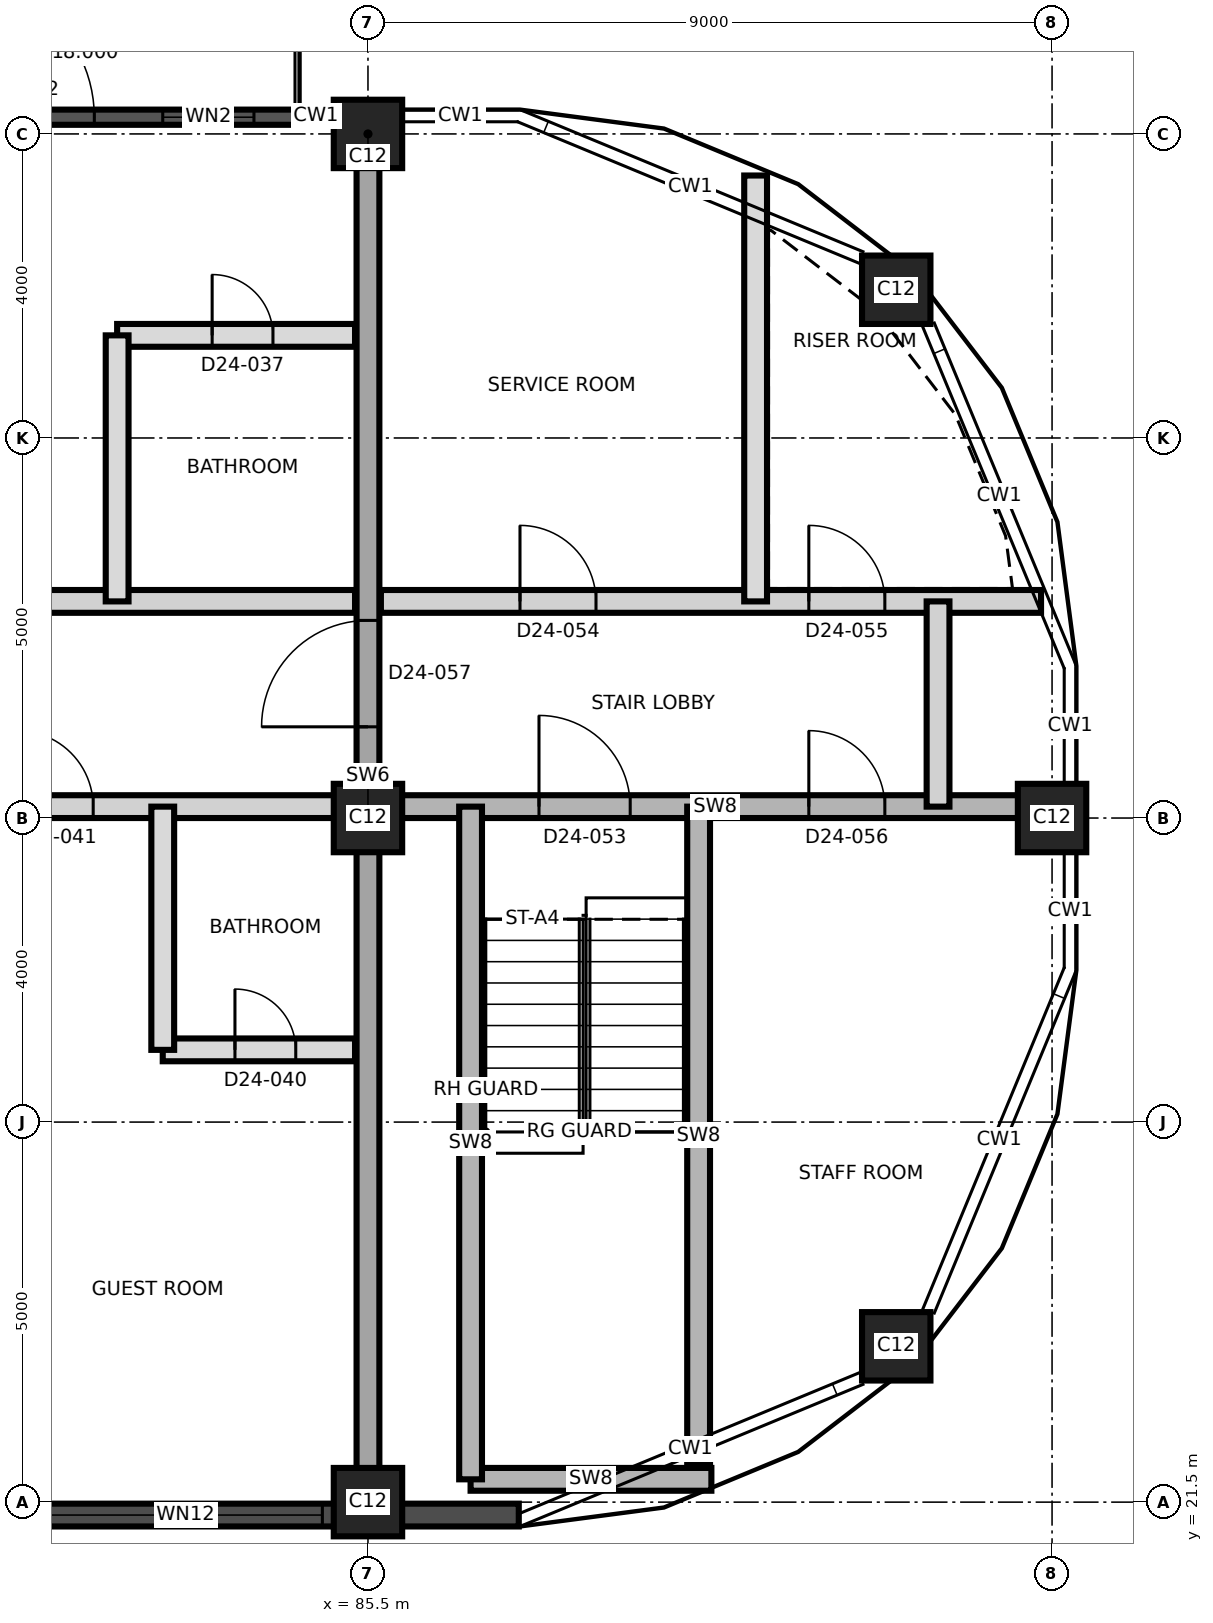
"""IFC4 building model, lengths in metres.
Left out: names, types, materials, properties, quantities, classifications, styles, units other than length and angle.
Written with IfcOpenShell. Run it as: python <this file> out.ifc"""

import sys

from ifc_helpers import new_model, si_unit, direction, frame, frame_2d, origin, origin_2d, place, context, subcontext, project, spatial, rectangle, extrude, element, fill, save


model = new_model("IFC4")
c1 = context("Model", 3, precision=1e-05, world=origin(), true_north=direction((0.0, 1.0)))
c2 = subcontext(c1, "Body", "Model", "MODEL_VIEW")
j1 = project(units=[si_unit("LENGTHUNIT", "METRE"), si_unit("PLANEANGLEUNIT", "RADIAN")], contexts=[c1])
p1 = place(None, origin())
s1 = spatial("IfcSite", under=j1, at=p1, CompositionType="ELEMENT")
p2 = place(p1, origin())
s2 = spatial("IfcBuilding", under=s1, at=p2, CompositionType="ELEMENT")
p3 = place(p2, frame((0.0, 0.0, 218.0)))
s3 = spatial("IfcBuildingStorey", under=s2, at=p3, CompositionType="ELEMENT", Elevation=218.0)
for number, where, z_axis, x_axis in (
    (1, (85.5, 21.5, 0.0), (0.0, 0.0, 1.0), (1.0, 0.0, 0.0)),
    (2, (92.45, 23.55, 0.0), (0.0, 0.0, 1.0), (1.0, 0.0, 0.0)),
    (3, (85.5, 30.5, 0.0), (0.0, 0.0, 1.0), (1.0, 0.0, 0.0)),
    (4, (94.5, 30.5, 0.0), (0.0, 0.0, 1.0), (1.0, 0.0, 0.0)),
    (5, (92.45, 37.45, 0.0), (0.0, 0.0, 1.0), (1.0, 0.0, 0.0)),
    (6, (85.5, 39.5, 0.0), (0.0, 0.0, 1.0), (1.0, 0.0, 0.0)),
):
    element("IfcColumn", number, at=place(p3, frame(where, z_axis=z_axis, x_axis=x_axis)), inside=s3, PredefinedType="COLUMN", context=c2, shape_type="SweptSolid", body=[
        extrude(rectangle(XDim=0.9, YDim=0.9, at=origin_2d()), origin(), (0.0, 0.0, 1.0), 3.7),
    ])
p4 = place(p3, frame((85.5, 21.53, 0.0), z_axis=(0.0, 0.0, 1.0), x_axis=(0.0, 1.0, 0.0)))
e7 = element("IfcWall", 7, at=p4, inside=s3, PredefinedType="SHEAR", context=c2, shape_type="SweptSolid", body=[
    extrude(rectangle(XDim=17.94, YDim=0.3, at=frame_2d((8.97, 0.0))), origin(), (0.0, 0.0, 1.0), 3.7),
])
p5 = place(p4, frame((10.17, 0.0, 0.0)))
e8 = element("IfcOpeningElement", 8, at=p5, cuts=e7, PredefinedType="OPENING", context=c2, shape_type="SweptSolid", body=[
    extrude(rectangle(XDim=1.4, YDim=2.1, at=frame_2d((0.7, 1.05))), frame((0.0, 0.16, 0.0), z_axis=(0.0, -1.0, 0.0), x_axis=(1.0, 0.0, 0.0)), (0.0, 0.0, 1.0), 0.32),
])
p6 = place(p3, frame((59.25, 21.33, 0.0), z_axis=(0.0, 0.0, 1.0), x_axis=(1.0, 0.0, 0.0)))
e9 = element("IfcWall", 9, at=p6, inside=s3, PredefinedType="SOLIDWALL", context=c2, shape_type="SweptSolid", body=[
    extrude(rectangle(XDim=28.234, YDim=0.3, at=frame_2d((14.117, 0.0))), origin(), (0.0, 0.0, 1.0), 3.4),
])
p7 = place(p6, frame((0.975, 0.0, 0.3)))
e10 = element("IfcOpeningElement", 10, at=p7, cuts=e9, PredefinedType="OPENING", context=c2, shape_type="SweptSolid", body=[
    extrude(rectangle(XDim=1.8, YDim=2.4, at=frame_2d((0.9, 1.2))), frame((0.0, 0.16, 0.0), z_axis=(0.0, -1.0, 0.0), x_axis=(1.0, 0.0, 0.0)), (0.0, 0.0, 1.0), 0.32),
])
p8 = place(p6, frame((4.05, 0.0, 0.9)))
e11 = element("IfcOpeningElement", 11, at=p8, cuts=e9, PredefinedType="OPENING", context=c2, shape_type="SweptSolid", body=[
    extrude(rectangle(XDim=3.6, YDim=1.5, at=frame_2d((1.8, 0.75))), frame((0.0, 0.16, 0.0), z_axis=(0.0, -1.0, 0.0), x_axis=(1.0, 0.0, 0.0)), (0.0, 0.0, 1.0), 0.32),
])
p9 = place(p6, frame((8.85, 0.0, 0.9)))
e12 = element("IfcOpeningElement", 12, at=p9, cuts=e9, PredefinedType="OPENING", context=c2, shape_type="SweptSolid", body=[
    extrude(rectangle(XDim=3.6, YDim=1.5, at=frame_2d((1.8, 0.75))), frame((0.0, 0.16, 0.0), z_axis=(0.0, -1.0, 0.0), x_axis=(1.0, 0.0, 0.0)), (0.0, 0.0, 1.0), 0.32),
])
p10 = place(p6, frame((13.05, 0.0, 0.9)))
e13 = element("IfcOpeningElement", 13, at=p10, cuts=e9, PredefinedType="OPENING", context=c2, shape_type="SweptSolid", body=[
    extrude(rectangle(XDim=3.6, YDim=1.5, at=frame_2d((1.8, 0.75))), frame((0.0, 0.16, 0.0), z_axis=(0.0, -1.0, 0.0), x_axis=(1.0, 0.0, 0.0)), (0.0, 0.0, 1.0), 0.32),
])
p11 = place(p6, frame((17.85, 0.0, 0.9)))
e14 = element("IfcOpeningElement", 14, at=p11, cuts=e9, PredefinedType="OPENING", context=c2, shape_type="SweptSolid", body=[
    extrude(rectangle(XDim=3.6, YDim=1.5, at=frame_2d((1.8, 0.75))), frame((0.0, 0.16, 0.0), z_axis=(0.0, -1.0, 0.0), x_axis=(1.0, 0.0, 0.0)), (0.0, 0.0, 1.0), 0.32),
])
p12 = place(p6, frame((22.05, 0.0, 0.9)))
e15 = element("IfcOpeningElement", 15, at=p12, cuts=e9, PredefinedType="OPENING", context=c2, shape_type="SweptSolid", body=[
    extrude(rectangle(XDim=3.6, YDim=1.5, at=frame_2d((1.8, 0.75))), frame((0.0, 0.16, 0.0), z_axis=(0.0, -1.0, 0.0), x_axis=(1.0, 0.0, 0.0)), (0.0, 0.0, 1.0), 0.32),
])
p13 = place(p3, frame((76.95, 39.72, 0.0), z_axis=(0.0, 0.0, 1.0), x_axis=(1.0, 0.0, 0.0)))
e16 = element("IfcWall", 16, at=p13, inside=s3, PredefinedType="SOLIDWALL", context=c2, shape_type="SweptSolid", body=[
    extrude(rectangle(XDim=8.1, YDim=0.2, at=frame_2d((4.05, 0.0))), origin(), (0.0, 0.0, 1.0), 3.4),
])
p14 = place(p13, frame((3.15, 0.0, 0.0)))
e17 = element("IfcOpeningElement", 17, at=p14, cuts=e16, PredefinedType="OPENING", context=c2, shape_type="SweptSolid", body=[
    extrude(rectangle(XDim=1.8, YDim=2.4, at=frame_2d((0.9, 1.2))), frame((0.0, 0.11, 0.0), z_axis=(0.0, -1.0, 0.0), x_axis=(1.0, 0.0, 0.0)), (0.0, 0.0, 1.0), 0.22),
])
p15 = place(p13, frame((5.85, 0.0, 0.9)))
e18 = element("IfcOpeningElement", 18, at=p15, cuts=e16, PredefinedType="OPENING", context=c2, shape_type="SweptSolid", body=[
    extrude(rectangle(XDim=1.2, YDim=2.1, at=frame_2d((0.6, 1.05))), frame((0.0, 0.11, 0.0), z_axis=(0.0, -1.0, 0.0), x_axis=(1.0, 0.0, 0.0)), (0.0, 0.0, 1.0), 0.22),
])
p16 = place(p13, frame((1.05, 0.0, 0.9)))
e19 = element("IfcOpeningElement", 19, at=p16, cuts=e16, PredefinedType="OPENING", context=c2, shape_type="SweptSolid", body=[
    extrude(rectangle(XDim=1.2, YDim=2.1, at=frame_2d((0.6, 1.05))), frame((0.0, 0.11, 0.0), z_axis=(0.0, -1.0, 0.0), x_axis=(1.0, 0.0, 0.0)), (0.0, 0.0, 1.0), 0.22),
])
p17 = place(p3, frame((86.85, 21.8, 0.0), z_axis=(0.0, 0.0, 1.0), x_axis=(1.0, 0.0, 0.0)))
e20 = element("IfcWall", 20, at=p17, inside=s3, PredefinedType="SHEAR", context=c2, shape_type="SweptSolid", body=[
    extrude(rectangle(XDim=3.168, YDim=0.3, at=frame_2d((1.584, 0.0))), origin(), (0.0, 0.0, 1.0), 3.4),
])
p18 = place(p3, frame((82.8, 27.45, 0.0), z_axis=(0.0, 0.0, 1.0), x_axis=(1.0, 0.0, 0.0)))
e21 = element("IfcWall", 21, at=p18, inside=s3, PredefinedType="PARTITIONING", context=c2, shape_type="SweptSolid", body=[
    extrude(rectangle(XDim=2.53, YDim=0.3, at=frame_2d((1.265, 0.0))), origin(), (0.0, 0.0, 1.0), 3.4),
])
p19 = place(p18, frame((0.95, 0.0, 0.0)))
e22 = element("IfcOpeningElement", 22, at=p19, cuts=e21, PredefinedType="OPENING", context=c2, shape_type="SweptSolid", body=[
    extrude(rectangle(XDim=0.8, YDim=2.1, at=frame_2d((0.4, 1.05))), frame((0.0, 0.16, 0.0), z_axis=(0.0, -1.0, 0.0), x_axis=(1.0, 0.0, 0.0)), (0.0, 0.0, 1.0), 0.32),
])
p20 = place(p3, frame((58.55, 30.65, 0.0), z_axis=(0.0, 0.0, 1.0), x_axis=(1.0, 0.0, 0.0)))
e23 = element("IfcWall", 23, at=p20, inside=s3, PredefinedType="PARTITIONING", context=c2, shape_type="SweptSolid", body=[
    extrude(rectangle(XDim=26.78, YDim=0.3, at=frame_2d((13.39, 0.0))), origin(), (0.0, 0.0, 1.0), 3.4),
])
p21 = place(p20, frame((2.3, 0.0, 0.0)))
e24 = element("IfcOpeningElement", 24, at=p21, cuts=e23, PredefinedType="OPENING", context=c2, shape_type="SweptSolid", body=[
    extrude(rectangle(XDim=1.0, YDim=2.4, at=frame_2d((0.5, 1.2))), frame((0.0, 0.16, 0.0), z_axis=(0.0, -1.0, 0.0), x_axis=(1.0, 0.0, 0.0)), (0.0, 0.0, 1.0), 0.32),
])
p22 = place(p20, frame((10.1, 0.0, 0.0)))
e25 = element("IfcOpeningElement", 25, at=p22, cuts=e23, PredefinedType="OPENING", context=c2, shape_type="SweptSolid", body=[
    extrude(rectangle(XDim=1.0, YDim=2.1, at=frame_2d((0.5, 1.05))), frame((0.0, 0.16, 0.0), z_axis=(0.0, -1.0, 0.0), x_axis=(1.0, 0.0, 0.0)), (0.0, 0.0, 1.0), 0.32),
])
p23 = place(p20, frame((15.95, 0.0, 0.0)))
e26 = element("IfcOpeningElement", 26, at=p23, cuts=e23, PredefinedType="OPENING", context=c2, shape_type="SweptSolid", body=[
    extrude(rectangle(XDim=1.0, YDim=2.1, at=frame_2d((0.5, 1.05))), frame((0.0, 0.16, 0.0), z_axis=(0.0, -1.0, 0.0), x_axis=(1.0, 0.0, 0.0)), (0.0, 0.0, 1.0), 0.32),
])
p24 = place(p20, frame((19.085, 0.0, 0.0)))
e27 = element("IfcOpeningElement", 27, at=p24, cuts=e23, PredefinedType="OPENING", context=c2, shape_type="SweptSolid", body=[
    extrude(rectangle(XDim=1.2, YDim=2.1, at=frame_2d((0.6, 1.05))), frame((0.0, 0.16, 0.0), z_axis=(0.0, -1.0, 0.0), x_axis=(1.0, 0.0, 0.0)), (0.0, 0.0, 1.0), 0.32),
])
p25 = place(p20, frame((22.335, 0.0, 0.0)))
e28 = element("IfcOpeningElement", 28, at=p25, cuts=e23, PredefinedType="OPENING", context=c2, shape_type="SweptSolid", body=[
    extrude(rectangle(XDim=1.0, YDim=2.1, at=frame_2d((0.5, 1.05))), frame((0.0, 0.16, 0.0), z_axis=(0.0, -1.0, 0.0), x_axis=(1.0, 0.0, 0.0)), (0.0, 0.0, 1.0), 0.32),
])
p26 = place(p3, frame((85.67, 30.65, 0.0), z_axis=(0.0, 0.0, 1.0), x_axis=(1.0, 0.0, 0.0)))
e29 = element("IfcWall", 29, at=p26, inside=s3, PredefinedType="SHEAR", context=c2, shape_type="SweptSolid", body=[
    extrude(rectangle(XDim=8.8, YDim=0.3, at=frame_2d((4.4, 0.0))), origin(), (0.0, 0.0, 1.0), 3.4),
])
p27 = place(p26, frame((2.08, 0.0, 0.0)))
e30 = element("IfcOpeningElement", 30, at=p27, cuts=e29, PredefinedType="OPENING", context=c2, shape_type="SweptSolid", body=[
    extrude(rectangle(XDim=1.2, YDim=2.1, at=frame_2d((0.6, 1.05))), frame((0.0, 0.16, 0.0), z_axis=(0.0, -1.0, 0.0), x_axis=(1.0, 0.0, 0.0)), (0.0, 0.0, 1.0), 0.32),
])
p28 = place(p26, frame((5.63, 0.0, 0.0)))
e31 = element("IfcOpeningElement", 31, at=p28, cuts=e29, PredefinedType="OPENING", context=c2, shape_type="SweptSolid", body=[
    extrude(rectangle(XDim=1.0, YDim=2.1, at=frame_2d((0.5, 1.05))), frame((0.0, 0.16, 0.0), z_axis=(0.0, -1.0, 0.0), x_axis=(1.0, 0.0, 0.0)), (0.0, 0.0, 1.0), 0.32),
])
p29 = place(p3, frame((58.55, 33.35, 0.0), z_axis=(0.0, 0.0, 1.0), x_axis=(1.0, 0.0, 0.0)))
e32 = element("IfcWall", 32, at=p29, inside=s3, PredefinedType="PARTITIONING", context=c2, shape_type="SweptSolid", body=[
    extrude(rectangle(XDim=26.78, YDim=0.3, at=frame_2d((13.39, 0.0))), origin(), (0.0, 0.0, 1.0), 3.4),
])
p30 = place(p29, frame((3.95, 0.0, 0.0)))
e33 = element("IfcOpeningElement", 33, at=p30, cuts=e32, PredefinedType="OPENING", context=c2, shape_type="SweptSolid", body=[
    extrude(rectangle(XDim=1.0, YDim=2.4, at=frame_2d((0.5, 1.2))), frame((0.0, 0.16, 0.0), z_axis=(0.0, -1.0, 0.0), x_axis=(1.0, 0.0, 0.0)), (0.0, 0.0, 1.0), 0.32),
])
p31 = place(p29, frame((12.05, 0.0, 0.0)))
e34 = element("IfcOpeningElement", 34, at=p31, cuts=e32, PredefinedType="OPENING", context=c2, shape_type="SweptSolid", body=[
    extrude(rectangle(XDim=1.0, YDim=2.1, at=frame_2d((0.5, 1.05))), frame((0.0, 0.16, 0.0), z_axis=(0.0, -1.0, 0.0), x_axis=(1.0, 0.0, 0.0)), (0.0, 0.0, 1.0), 0.32),
])
p32 = place(p29, frame((13.85, 0.0, 0.0)))
e35 = element("IfcOpeningElement", 35, at=p32, cuts=e32, PredefinedType="OPENING", context=c2, shape_type="SweptSolid", body=[
    extrude(rectangle(XDim=1.0, YDim=2.1, at=frame_2d((0.5, 1.05))), frame((0.0, 0.16, 0.0), z_axis=(0.0, -1.0, 0.0), x_axis=(1.0, 0.0, 0.0)), (0.0, 0.0, 1.0), 0.32),
])
p33 = place(p29, frame((20.3, 0.0, 0.0)))
e36 = element("IfcOpeningElement", 36, at=p33, cuts=e32, PredefinedType="OPENING", context=c2, shape_type="SweptSolid", body=[
    extrude(rectangle(XDim=1.0, YDim=2.4, at=frame_2d((0.5, 1.2))), frame((0.0, 0.16, 0.0), z_axis=(0.0, -1.0, 0.0), x_axis=(1.0, 0.0, 0.0)), (0.0, 0.0, 1.0), 0.32),
])
p34 = place(p3, frame((85.67, 33.35, 0.0), z_axis=(0.0, 0.0, 1.0), x_axis=(1.0, 0.0, 0.0)))
e37 = element("IfcWall", 37, at=p34, inside=s3, PredefinedType="PARTITIONING", context=c2, shape_type="SweptSolid", body=[
    extrude(rectangle(XDim=8.685, YDim=0.3, at=frame_2d((4.343, 0.0))), origin(), (0.0, 0.0, 1.0), 3.4),
])
p35 = place(p34, frame((1.83, 0.0, 0.0)))
e38 = element("IfcOpeningElement", 38, at=p35, cuts=e37, PredefinedType="OPENING", context=c2, shape_type="SweptSolid", body=[
    extrude(rectangle(XDim=1.0, YDim=2.1, at=frame_2d((0.5, 1.05))), frame((0.0, 0.16, 0.0), z_axis=(0.0, -1.0, 0.0), x_axis=(1.0, 0.0, 0.0)), (0.0, 0.0, 1.0), 0.32),
])
p36 = place(p34, frame((5.63, 0.0, 0.0)))
e39 = element("IfcOpeningElement", 39, at=p36, cuts=e37, PredefinedType="OPENING", context=c2, shape_type="SweptSolid", body=[
    extrude(rectangle(XDim=1.0, YDim=2.1, at=frame_2d((0.5, 1.05))), frame((0.0, 0.16, 0.0), z_axis=(0.0, -1.0, 0.0), x_axis=(1.0, 0.0, 0.0)), (0.0, 0.0, 1.0), 0.32),
])
p37 = place(p3, frame((82.2, 36.85, 0.0), z_axis=(0.0, 0.0, 1.0), x_axis=(1.0, 0.0, 0.0)))
e40 = element("IfcWall", 40, at=p37, inside=s3, PredefinedType="PARTITIONING", context=c2, shape_type="SweptSolid", body=[
    extrude(rectangle(XDim=3.13, YDim=0.3, at=frame_2d((1.565, 0.0))), origin(), (0.0, 0.0, 1.0), 3.4),
])
p38 = place(p37, frame((1.25, 0.0, 0.0)))
e41 = element("IfcOpeningElement", 41, at=p38, cuts=e40, PredefinedType="OPENING", context=c2, shape_type="SweptSolid", body=[
    extrude(rectangle(XDim=0.8, YDim=2.1, at=frame_2d((0.4, 1.05))), frame((0.0, 0.16, 0.0), z_axis=(0.0, -1.0, 0.0), x_axis=(1.0, 0.0, 0.0)), (0.0, 0.0, 1.0), 0.32),
])
p39 = place(p3, frame((82.2, 33.35, 0.0), z_axis=(0.0, 0.0, 1.0), x_axis=(0.0, 1.0, 0.0)))
e42 = element("IfcWall", 42, at=p39, inside=s3, PredefinedType="PARTITIONING", context=c2, shape_type="SweptSolid", body=[
    extrude(rectangle(XDim=3.5, YDim=0.3, at=frame_2d((1.75, 0.0))), origin(), (0.0, 0.0, 1.0), 3.4),
])
p40 = place(p3, frame((82.8, 27.45, 0.0), z_axis=(0.0, 0.0, 1.0), x_axis=(0.0, 1.0, 0.0)))
e43 = element("IfcWall", 43, at=p40, inside=s3, PredefinedType="PARTITIONING", context=c2, shape_type="SweptSolid", body=[
    extrude(rectangle(XDim=3.2, YDim=0.3, at=frame_2d((1.6, 0.0))), origin(), (0.0, 0.0, 1.0), 3.4),
])
p41 = place(p3, frame((86.85, 21.8, 0.0), z_axis=(0.0, 0.0, 1.0), x_axis=(0.0, 1.0, 0.0)))
e44 = element("IfcWall", 44, at=p41, inside=s3, PredefinedType="SHEAR", context=c2, shape_type="SweptSolid", body=[
    extrude(rectangle(XDim=8.85, YDim=0.3, at=frame_2d((4.425, 0.0))), origin(), (0.0, 0.0, 1.0), 3.4),
])
p42 = place(p3, frame((89.85, 21.997, 0.0), z_axis=(0.0, 0.0, 1.0), x_axis=(0.0, 1.0, 0.0)))
e45 = element("IfcWall", 45, at=p42, inside=s3, PredefinedType="SHEAR", context=c2, shape_type="SweptSolid", body=[
    extrude(rectangle(XDim=8.653, YDim=0.3, at=frame_2d((4.326, 0.0))), origin(), (0.0, 0.0, 1.0), 3.4),
])
p43 = place(p3, frame((90.6, 33.35, 0.0), z_axis=(0.0, 0.0, 1.0), x_axis=(0.0, 1.0, 0.0)))
e46 = element("IfcWall", 46, at=p43, inside=s3, PredefinedType="PARTITIONING", context=c2, shape_type="SweptSolid", body=[
    extrude(rectangle(XDim=5.603, YDim=0.3, at=frame_2d((2.801, 0.0))), origin(), (0.0, 0.0, 1.0), 3.4),
])
p44 = place(p3, frame((93.0, 30.65, 0.0), z_axis=(0.0, 0.0, 1.0), x_axis=(0.0, 1.0, 0.0)))
e47 = element("IfcWall", 47, at=p44, inside=s3, PredefinedType="PARTITIONING", context=c2, shape_type="SweptSolid", body=[
    extrude(rectangle(XDim=2.7, YDim=0.3, at=frame_2d((1.35, 0.0))), origin(), (0.0, 0.0, 1.0), 3.4),
])
p45 = place(p12, origin())
e48 = element("IfcWindow", 48, at=p45, inside=s3, PartitioningType="SINGLE_PANEL", PredefinedType="WINDOW", context=c2, shape_type="SweptSolid", body=[
    extrude(rectangle(XDim=3.6, YDim=1.5, at=frame_2d((1.8, 0.75))), frame((0.0, 0.03, 0.0), z_axis=(0.0, -1.0, 0.0), x_axis=(1.0, 0.0, 0.0)), (0.0, 0.0, 1.0), 0.06),
])
fill(e15, e48)
p46 = place(p14, origin())
e49 = element("IfcDoor", 49, at=p46, inside=s3, OperationType="SINGLE_SWING_LEFT", PredefinedType="DOOR", context=c2, shape_type="SweptSolid", body=[
    extrude(rectangle(XDim=1.8, YDim=2.4, at=frame_2d((0.9, 1.2))), frame((0.0, 0.025, 0.0), z_axis=(0.0, -1.0, 0.0), x_axis=(1.0, 0.0, 0.0)), (0.0, 0.0, 1.0), 0.05),
])
fill(e17, e49)
p47 = place(p15, origin())
e50 = element("IfcWindow", 50, at=p47, inside=s3, PartitioningType="SINGLE_PANEL", PredefinedType="WINDOW", context=c2, shape_type="SweptSolid", body=[
    extrude(rectangle(XDim=1.2, YDim=2.1, at=frame_2d((0.6, 1.05))), frame((0.0, 0.03, 0.0), z_axis=(0.0, -1.0, 0.0), x_axis=(1.0, 0.0, 0.0)), (0.0, 0.0, 1.0), 0.06),
])
fill(e18, e50)
p48 = place(p38, origin())
e51 = element("IfcDoor", 51, at=p48, inside=s3, OperationType="SINGLE_SWING_LEFT", PredefinedType="DOOR", context=c2, shape_type="SweptSolid", body=[
    extrude(rectangle(XDim=0.8, YDim=2.1, at=frame_2d((0.4, 1.05))), frame((0.0, 0.025, 0.0), z_axis=(0.0, -1.0, 0.0), x_axis=(1.0, 0.0, 0.0)), (0.0, 0.0, 1.0), 0.05),
])
fill(e41, e51)
p49 = place(p19, origin())
e52 = element("IfcDoor", 52, at=p49, inside=s3, OperationType="SINGLE_SWING_LEFT", PredefinedType="DOOR", context=c2, shape_type="SweptSolid", body=[
    extrude(rectangle(XDim=0.8, YDim=2.1, at=frame_2d((0.4, 1.05))), frame((0.0, 0.025, 0.0), z_axis=(0.0, -1.0, 0.0), x_axis=(1.0, 0.0, 0.0)), (0.0, 0.0, 1.0), 0.05),
])
fill(e22, e52)
p50 = place(p25, origin())
e53 = element("IfcDoor", 53, at=p50, inside=s3, OperationType="SINGLE_SWING_LEFT", PredefinedType="DOOR", context=c2, shape_type="SweptSolid", body=[
    extrude(rectangle(XDim=1.0, YDim=2.1, at=frame_2d((0.5, 1.05))), frame((0.0, 0.025, 0.0), z_axis=(0.0, -1.0, 0.0), x_axis=(1.0, 0.0, 0.0)), (0.0, 0.0, 1.0), 0.05),
])
fill(e28, e53)
p51 = place(p27, origin())
e54 = element("IfcDoor", 54, at=p51, inside=s3, OperationType="SINGLE_SWING_LEFT", PredefinedType="DOOR", context=c2, shape_type="SweptSolid", body=[
    extrude(rectangle(XDim=1.2, YDim=2.1, at=frame_2d((0.6, 1.05))), frame((0.0, 0.025, 0.0), z_axis=(0.0, -1.0, 0.0), x_axis=(1.0, 0.0, 0.0)), (0.0, 0.0, 1.0), 0.05),
])
fill(e30, e54)
p52 = place(p35, origin())
e55 = element("IfcDoor", 55, at=p52, inside=s3, OperationType="SINGLE_SWING_LEFT", PredefinedType="DOOR", context=c2, shape_type="SweptSolid", body=[
    extrude(rectangle(XDim=1.0, YDim=2.1, at=frame_2d((0.5, 1.05))), frame((0.0, 0.025, 0.0), z_axis=(0.0, -1.0, 0.0), x_axis=(1.0, 0.0, 0.0)), (0.0, 0.0, 1.0), 0.05),
])
fill(e38, e55)
p53 = place(p36, origin())
e56 = element("IfcDoor", 56, at=p53, inside=s3, OperationType="SINGLE_SWING_RIGHT", PredefinedType="DOOR", context=c2, shape_type="SweptSolid", body=[
    extrude(rectangle(XDim=1.0, YDim=2.1, at=frame_2d((0.5, 1.05))), frame((0.0, 0.025, 0.0), z_axis=(0.0, -1.0, 0.0), x_axis=(1.0, 0.0, 0.0)), (0.0, 0.0, 1.0), 0.05),
])
fill(e39, e56)
p54 = place(p28, origin())
e57 = element("IfcDoor", 57, at=p54, inside=s3, OperationType="SINGLE_SWING_LEFT", PredefinedType="DOOR", context=c2, shape_type="SweptSolid", body=[
    extrude(rectangle(XDim=1.0, YDim=2.1, at=frame_2d((0.5, 1.05))), frame((0.0, 0.025, 0.0), z_axis=(0.0, -1.0, 0.0), x_axis=(1.0, 0.0, 0.0)), (0.0, 0.0, 1.0), 0.05),
])
fill(e31, e57)
p55 = place(p5, origin())
e58 = element("IfcDoor", 58, at=p55, inside=s3, OperationType="SINGLE_SWING_RIGHT", PredefinedType="DOOR", context=c2, shape_type="SweptSolid", body=[
    extrude(rectangle(XDim=1.4, YDim=2.1, at=frame_2d((0.7, 1.05))), frame((0.0, 0.025, 0.0), z_axis=(0.0, -1.0, 0.0), x_axis=(1.0, 0.0, 0.0)), (0.0, 0.0, 1.0), 0.05),
])
fill(e8, e58)
save(model, sys.argv[1])
